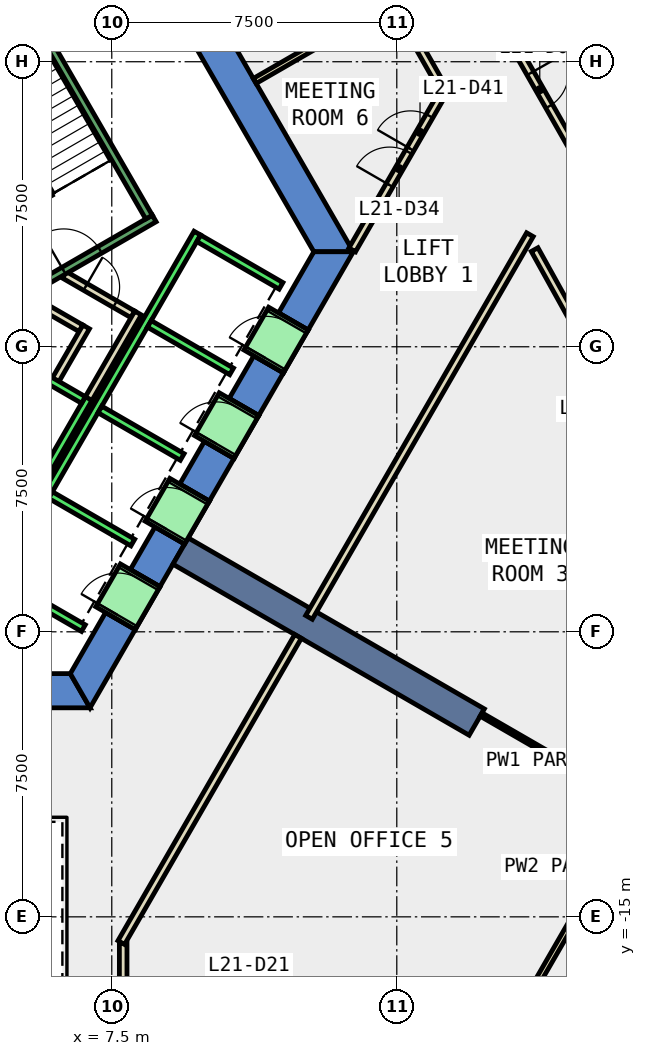
"""IFC4 building model, lengths in metres.
Left out: names, types, materials, properties, quantities, classifications, styles, units other than length and angle.
Written with IfcOpenShell. Run it as: python <this file> out.ifc"""

import sys

from ifc_helpers import new_model, si_unit, direction, frame, frame_2d, origin, place, context, subcontext, project, spatial, polyline, rectangle, outline, extrude, element, fill, save


model = new_model("IFC4")
c1 = context("Model", 3, precision=1e-05, world=origin(), true_north=direction((0.0, 1.0)))
c2 = subcontext(c1, "Body", "Model", "MODEL_VIEW")
j1 = project(units=[si_unit("LENGTHUNIT", "METRE"), si_unit("PLANEANGLEUNIT", "RADIAN")], contexts=[c1])
p1 = place(None, origin())
s1 = spatial("IfcSite", under=j1, at=p1, CompositionType="ELEMENT")
p2 = place(p1, origin())
s2 = spatial("IfcBuilding", under=s1, at=p2, CompositionType="ELEMENT")
p3 = place(p2, frame((0.0, 0.0, 99.2)))
s3 = spatial("IfcBuildingStorey", under=s2, at=p3, CompositionType="ELEMENT", Elevation=99.2)
p4 = place(p3, frame((0.0, 0.0, -0.4)))
e1 = element("IfcWall", 1, at=p4, inside=s3, PredefinedType="SHEAR", context=c2, shape_type="SweptSolid", body=[
    extrude(outline(polyline([(8.517, 11.748), (7.738, 11.298), (12.817, 2.5), (13.856, 2.5), (8.517, 11.748)])), origin(), (0.0, 0.0, 1.0), 4.2),
])
p5 = place(p3, frame((0.0, 0.0, -0.4)))
e2 = element("IfcWall", 2, at=p5, inside=s3, PredefinedType="SHEAR", context=c2, shape_type="SweptSolid", body=[
    extrude(outline(polyline([(5.75, -8.6), (5.75, -9.5), (6.928, -9.5), (6.409, -8.6), (5.75, -8.6)])), origin(), (0.0, 0.0, 1.0), 4.2),
])
p6 = place(p3, frame((0.0, 0.0, -0.4)))
e3 = element("IfcWall", 3, at=p6, inside=s3, PredefinedType="SHEAR", context=c2, shape_type="SweptSolid", body=[
    extrude(outline(polyline([(8.117, -7.44), (7.338, -6.99), (6.409, -8.6), (6.928, -9.5), (8.117, -7.44)])), origin(), (0.0, 0.0, 1.0), 4.2),
])
p7 = place(p3, frame((0.0, 0.0, -0.4)))
e4 = element("IfcWall", 4, at=p7, inside=s3, PredefinedType="SHEAR", context=c2, shape_type="SweptSolid", body=[
    extrude(outline(polyline([(9.417, -5.189), (8.638, -4.739), (7.988, -5.864), (8.767, -6.314), (9.417, -5.189)])), origin(), (0.0, 0.0, 1.0), 4.2),
])
p8 = place(p3, frame((0.0, 0.0, -0.4)))
e5 = element("IfcWall", 5, at=p8, inside=s3, PredefinedType="SHEAR", context=c2, shape_type="SweptSolid", body=[
    extrude(outline(polyline([(10.717, -2.937), (9.938, -2.487), (9.288, -3.613), (10.067, -4.063), (10.717, -2.937)])), origin(), (0.0, 0.0, 1.0), 4.2),
])
p9 = place(p3, frame((0.0, 0.0, -0.4)))
e6 = element("IfcWall", 6, at=p9, inside=s3, PredefinedType="SHEAR", context=c2, shape_type="SweptSolid", body=[
    extrude(outline(polyline([(12.017, -0.686), (11.238, -0.236), (10.588, -1.361), (11.367, -1.811), (12.017, -0.686)])), origin(), (0.0, 0.0, 1.0), 4.2),
])
p10 = place(p3, frame((0.0, 0.0, -0.4)))
e7 = element("IfcWall", 7, at=p10, inside=s3, PredefinedType="SHEAR", context=c2, shape_type="SweptSolid", body=[
    extrude(outline(polyline([(11.888, 0.89), (12.667, 0.44), (13.856, 2.5), (12.817, 2.5), (11.888, 0.89)])), origin(), (0.0, 0.0, 1.0), 4.2),
])
p11 = place(p3, frame((0.0, 0.0, 3.6)))
e8 = element("IfcWall", 8, at=p11, inside=s3, PredefinedType="SHEAR", context=c2, shape_type="SweptSolid", body=[
    extrude(outline(polyline([(8.767, -6.314), (7.988, -5.864), (7.338, -6.99), (8.117, -7.44), (8.767, -6.314)])), origin(), (0.0, 0.0, 1.0), 0.2),
])
p12 = place(p3, frame((0.0, 0.0, 3.6)))
e9 = element("IfcWall", 9, at=p12, inside=s3, PredefinedType="SHEAR", context=c2, shape_type="SweptSolid", body=[
    extrude(outline(polyline([(10.067, -4.063), (9.288, -3.613), (8.638, -4.739), (9.417, -5.189), (10.067, -4.063)])), origin(), (0.0, 0.0, 1.0), 0.2),
])
p13 = place(p3, frame((0.0, 0.0, 3.6)))
e10 = element("IfcWall", 10, at=p13, inside=s3, PredefinedType="SHEAR", context=c2, shape_type="SweptSolid", body=[
    extrude(outline(polyline([(11.367, -1.811), (10.588, -1.361), (9.938, -2.487), (10.717, -2.937), (11.367, -1.811)])), origin(), (0.0, 0.0, 1.0), 0.2),
])
p14 = place(p3, frame((0.0, 0.0, 3.6)))
e11 = element("IfcWall", 11, at=p14, inside=s3, PredefinedType="SHEAR", context=c2, shape_type="SweptSolid", body=[
    extrude(outline(polyline([(12.667, 0.44), (11.888, 0.89), (11.238, -0.236), (12.017, -0.686), (12.667, 0.44)])), origin(), (0.0, 0.0, 1.0), 0.2),
])
p15 = place(p3, frame((9.31, -5.375, -0.4), z_axis=(0.0, 0.0, 1.0), x_axis=(0.866017533419, -0.500013631625, 0.0)))
e12 = element("IfcWall", 12, at=p15, inside=s3, PredefinedType="SHEAR", context=c2, shape_type="SweptSolid", body=[
    extrude(rectangle(XDim=9.0, YDim=0.8, at=frame_2d((4.5, 0.0))), origin(), (0.0, 0.0, 1.0), 4.2),
])
p16 = place(p3, frame((16.195, 6.824, 0.0), z_axis=(0.0, 0.0, 1.0), x_axis=(-0.494984897559, 0.868901577388, 0.0)))
e13 = element("IfcWall", 13, at=p16, inside=s3, PredefinedType="PARTITIONING", context=c2, shape_type="SweptSolid", body=[
    extrude(rectangle(XDim=2.188, YDim=0.2, at=frame_2d((1.094, 0.0))), origin(), (0.0, 0.0, 1.0), 3.8),
])
p17 = place(p3, frame((22.071, -3.65, 0.0), z_axis=(0.0, 0.0, 1.0), x_axis=(-0.485198988697, 0.874403763354, 0.0)))
e14 = element("IfcWall", 14, at=p17, inside=s3, PredefinedType="PARTITIONING", context=c2, shape_type="SweptSolid", body=[
    extrude(rectangle(XDim=7.098, YDim=0.2, at=frame_2d((3.549, 0.0))), origin(), (0.0, 0.0, 1.0), 3.8),
])
p18 = place(p17, frame((3.049, 0.0, 0.0)))
e15 = element("IfcOpeningElement", 15, at=p18, cuts=e14, PredefinedType="OPENING", context=c2, shape_type="SweptSolid", body=[
    extrude(rectangle(XDim=1.0, YDim=2.1, at=frame_2d((0.5, 1.05))), frame((0.0, 0.11, 0.0), z_axis=(0.0, -1.0, 0.0), x_axis=(1.0, 0.0, 0.0)), (0.0, 0.0, 1.0), 0.22),
])
p19 = place(p3, frame((16.98, 9.89, 0.0), z_axis=(0.0, 0.0, 1.0), x_axis=(0.495123170501, -0.868822793228, 0.0)))
e16 = element("IfcWall", 16, at=p19, inside=s3, PredefinedType="PARTITIONING", context=c2, shape_type="SweptSolid", body=[
    extrude(rectangle(XDim=7.198, YDim=0.2, at=frame_2d((3.599, 0.0))), origin(), (0.0, 0.0, 1.0), 3.8),
])
p20 = place(p19, frame((3.099, 0.0, 0.0)))
e17 = element("IfcOpeningElement", 17, at=p20, cuts=e16, PredefinedType="OPENING", context=c2, shape_type="SweptSolid", body=[
    extrude(rectangle(XDim=1.0, YDim=2.1, at=frame_2d((0.5, 1.05))), frame((0.0, 0.11, 0.0), z_axis=(0.0, -1.0, 0.0), x_axis=(1.0, 0.0, 0.0)), (0.0, 0.0, 1.0), 0.22),
])
p21 = place(p3, frame((5.499, 1.172, 0.0), z_axis=(0.0, 0.0, 1.0), x_axis=(0.866333505267, -0.499465972466, 0.0)))
e18 = element("IfcWall", 18, at=p21, inside=s3, PredefinedType="PARTITIONING", context=c2, shape_type="SweptSolid", body=[
    extrude(rectangle(XDim=1.374, YDim=0.2, at=frame_2d((0.687, 0.0))), origin(), (0.0, 0.0, 1.0), 3.8),
])
p22 = place(p3, frame((6.826, 0.522, 0.0), z_axis=(0.0, 0.0, 1.0), x_axis=(-0.500016722714, -0.866015748706, 0.0)))
e19 = element("IfcWall", 19, at=p22, inside=s3, PredefinedType="PARTITIONING", context=c2, shape_type="SweptSolid", body=[
    extrude(rectangle(XDim=1.7, YDim=0.2, at=frame_2d((0.85, 0.0))), origin(), (0.0, 0.0, 1.0), 3.8),
])
p23 = place(p3, frame((6.25, 1.894, 0.0), z_axis=(0.0, 0.0, 1.0), x_axis=(0.866043184279, -0.499969202016, 0.0)))
e20 = element("IfcWall", 20, at=p23, inside=s3, PredefinedType="PARTITIONING", context=c2, shape_type="SweptSolid", body=[
    extrude(rectangle(XDim=2.084, YDim=0.2, at=frame_2d((1.042, 0.0))), origin(), (0.0, 0.0, 1.0), 3.8),
])
p24 = place(p23, frame((0.642, 0.0, 0.0)))
e21 = element("IfcOpeningElement", 21, at=p24, cuts=e20, PredefinedType="OPENING", context=c2, shape_type="SweptSolid", body=[
    extrude(rectangle(XDim=0.9, YDim=2.1, at=frame_2d((0.45, 1.05))), frame((0.0, 0.11, 0.0), z_axis=(0.0, -1.0, 0.0), x_axis=(1.0, 0.0, 0.0)), (0.0, 0.0, 1.0), 0.22),
])
p25 = place(p3, frame((8.192, 0.888, 0.0), z_axis=(0.0, 0.0, 1.0), x_axis=(-0.499940625693, -0.866059680843, 0.0)))
e22 = element("IfcWall", 22, at=p25, inside=s3, PredefinedType="PARTITIONING", context=c2, shape_type="SweptSolid", body=[
    extrude(rectangle(XDim=2.68, YDim=0.2, at=frame_2d((1.34, 0.0))), origin(), (0.0, 0.0, 1.0), 3.8),
])
p26 = place(p3, frame((11.261, 6.994, 0.0), z_axis=(0.0, 0.0, 1.0), x_axis=(0.866037428454, 0.499979172084, 0.0)))
e23 = element("IfcWall", 23, at=p26, inside=s3, PredefinedType="PARTITIONING", context=c2, shape_type="SweptSolid", body=[
    extrude(rectangle(XDim=4.198, YDim=0.15, at=frame_2d((2.099, 0.0))), origin(), (0.0, 0.0, 1.0), 3.8),
])
p27 = place(p3, frame((13.827, 2.55, 0.0), z_axis=(0.0, 0.0, 1.0), x_axis=(0.500070719615, 0.865984569946, 0.0)))
e24 = element("IfcWall", 24, at=p27, inside=s3, PredefinedType="PARTITIONING", context=c2, shape_type="SweptSolid", body=[
    extrude(rectangle(XDim=4.935, YDim=0.2, at=frame_2d((2.468, 0.0))), origin(), (0.0, 0.0, 1.0), 3.8),
])
p28 = place(p27, frame((1.968, 0.0, 0.0)))
e25 = element("IfcOpeningElement", 25, at=p28, cuts=e24, PredefinedType="OPENING", context=c2, shape_type="SweptSolid", body=[
    extrude(rectangle(XDim=1.0, YDim=2.1, at=frame_2d((0.5, 1.05))), frame((0.0, 0.11, 0.0), z_axis=(0.0, -1.0, 0.0), x_axis=(1.0, 0.0, 0.0)), (0.0, 0.0, 1.0), 0.22),
])
p29 = place(p27, frame((3.068, 0.0, 0.0)))
e26 = element("IfcOpeningElement", 26, at=p29, cuts=e24, PredefinedType="OPENING", context=c2, shape_type="SweptSolid", body=[
    extrude(rectangle(XDim=1.0, YDim=2.1, at=frame_2d((0.5, 1.05))), frame((0.0, 0.11, 0.0), z_axis=(0.0, -1.0, 0.0), x_axis=(1.0, 0.0, 0.0)), (0.0, 0.0, 1.0), 0.22),
])
p30 = place(p3, frame((7.8, -15.69, 0.0), z_axis=(0.0, 0.0, 1.0), x_axis=(0.0, -1.0, 0.0)))
e27 = element("IfcWall", 27, at=p30, inside=s3, PredefinedType="PARTITIONING", context=c2, shape_type="SweptSolid", body=[
    extrude(rectangle(XDim=1.7, YDim=0.2, at=frame_2d((0.85, 0.0))), origin(), (0.0, 0.0, 1.0), 3.8),
])
p31 = place(p3, frame((12.401, -7.621, 0.0), z_axis=(0.0, 0.0, 1.0), x_axis=(-0.499983724212, -0.866034800411, 0.0)))
e28 = element("IfcWall", 28, at=p31, inside=s3, PredefinedType="PARTITIONING", context=c2, shape_type="SweptSolid", body=[
    extrude(rectangle(XDim=9.302, YDim=0.2, at=frame_2d((4.651, 0.0))), origin(), (0.0, 0.0, 1.0), 3.8),
])
p32 = place(p3, frame((18.503, 2.949, 0.0), z_axis=(0.0, 0.0, 1.0), x_axis=(-0.49997390151, -0.86604047123, 0.0)))
e29 = element("IfcWall", 29, at=p32, inside=s3, PredefinedType="PARTITIONING", context=c2, shape_type="SweptSolid", body=[
    extrude(rectangle(XDim=11.626, YDim=0.2, at=frame_2d((5.813, 0.0))), origin(), (0.0, 0.0, 1.0), 3.8),
])
p33 = place(p3, frame((17.219, -9.676, 0.0), z_axis=(0.0, 0.0, 1.0), x_axis=(0.86598459596, -0.500070674565, 0.0)))
e30 = element("IfcWall", 30, at=p33, inside=s3, PredefinedType="PARTITIONING", context=c2, shape_type="SweptSolid", body=[
    extrude(rectangle(XDim=4.875, YDim=0.1, at=frame_2d((2.438, 0.0))), origin(), (0.0, 0.0, 1.0), 3.8),
])
p34 = place(p3, frame((21.236, -12.319, 0.0), z_axis=(0.0, 0.0, 1.0), x_axis=(-0.500016488359, -0.866015884017, 0.0)))
e31 = element("IfcWall", 31, at=p34, inside=s3, PredefinedType="PARTITIONING", context=c2, shape_type="SweptSolid", body=[
    extrude(rectangle(XDim=5.702, YDim=0.15, at=frame_2d((2.851, 0.0))), origin(), (0.0, 0.0, 1.0), 3.8),
])
p35 = place(p3, frame((5.492, -3.788, 0.0), z_axis=(0.0, 0.0, 1.0), x_axis=(0.500011755427, 0.866018616679, 0.0)))
e32 = element("IfcWall", 32, at=p35, inside=s3, PredefinedType="STANDARD", context=c2, shape_type="SweptSolid", body=[
    extrude(rectangle(XDim=2.8, YDim=0.2, at=frame_2d((1.4, 0.0))), origin(), (0.0, 0.0, 1.0), 3.8),
])
p36 = place(p3, frame((4.677, -0.2, 0.0), z_axis=(0.0, 0.0, 1.0), x_axis=(0.865973769406, -0.500089422704, 0.0)))
e33 = element("IfcWall", 33, at=p36, inside=s3, PredefinedType="STANDARD", context=c2, shape_type="SweptSolid", body=[
    extrude(rectangle(XDim=2.399, YDim=0.2, at=frame_2d((1.2, 0.0))), origin(), (0.0, 0.0, 1.0), 3.8),
])
p37 = place(p3, frame((4.451, -6.19, 0.0), z_axis=(0.0, 0.0, 1.0), x_axis=(0.50000090737, 0.866024879913, 0.0)))
e34 = element("IfcWall", 34, at=p37, inside=s3, PredefinedType="STANDARD", context=c2, shape_type="SweptSolid", body=[
    extrude(rectangle(XDim=10.6, YDim=0.2, at=frame_2d((5.3, 0.0))), origin(), (0.0, 0.0, 1.0), 3.8),
])
for number, where, z_axis, x_axis in (
    (35, (4.588, -6.153, 0.0), (0.0, 0.0, 1.0), (0.866, -0.5, 0.0)),
    (36, (5.888, -3.902, 0.0), (0.0, 0.0, 1.0), (0.866, -0.5, 0.0)),
    (37, (7.188, -1.65, 0.0), (0.0, 0.0, 1.0), (0.866, -0.5, 0.0)),
    (38, (8.488, 0.602, 0.0), (0.0, 0.0, 1.0), (0.866, -0.5, 0.0)),
):
    element("IfcWall", number, at=place(p3, frame(where, z_axis=z_axis, x_axis=x_axis)), inside=s3, PredefinedType="STANDARD", context=c2, shape_type="SweptSolid", body=[
        extrude(rectangle(XDim=2.5, YDim=0.2, at=frame_2d((1.25, 0.0))), origin(), (0.0, 0.0, 1.0), 3.8),
    ])
p38 = place(p3, frame((9.788, 2.853, 0.0), z_axis=(0.0, 0.0, 1.0), x_axis=(0.865998541277, -0.500046524342, 0.0)))
e39 = element("IfcWall", 39, at=p38, inside=s3, PredefinedType="STANDARD", context=c2, shape_type="SweptSolid", body=[
    extrude(rectangle(XDim=2.5, YDim=0.2, at=frame_2d((1.25, 0.0))), origin(), (0.0, 0.0, 1.0), 3.8),
])
p39 = place(p3, frame((7.598, -7.14, 0.0), z_axis=(0.0, 0.0, 1.0), x_axis=(0.500362116554, 0.865816234728, 0.0)))
e40 = element("IfcWall", 40, at=p39, inside=s3, PredefinedType="STANDARD", context=c2, shape_type="SweptSolid", body=[
    extrude(rectangle(XDim=1.299, YDim=1.2, at=frame_2d((0.65, 0.0))), origin(), (0.0, 0.0, 1.0), 2.4),
])
p40 = place(p39, frame((0.1, 0.0, 0.0)))
e41 = element("IfcOpeningElement", 41, at=p40, cuts=e40, PredefinedType="OPENING", context=c2, shape_type="SweptSolid", body=[
    extrude(rectangle(XDim=1.1, YDim=2.3, at=frame_2d((0.55, 1.15))), frame((0.0, 0.61, 0.0), z_axis=(0.0, -1.0, 0.0), x_axis=(1.0, 0.0, 0.0)), (0.0, 0.0, 1.0), 1.22),
])
p41 = place(p3, frame((8.898, -4.889, 0.0), z_axis=(0.0, 0.0, 1.0), x_axis=(0.500036693733, 0.866004217611, 0.0)))
e42 = element("IfcWall", 42, at=p41, inside=s3, PredefinedType="STANDARD", context=c2, shape_type="SweptSolid", body=[
    extrude(rectangle(XDim=1.3, YDim=1.2, at=frame_2d((0.65, 0.0))), origin(), (0.0, 0.0, 1.0), 2.4),
])
p42 = place(p41, frame((0.1, 0.0, 0.0)))
e43 = element("IfcOpeningElement", 43, at=p42, cuts=e42, PredefinedType="OPENING", context=c2, shape_type="SweptSolid", body=[
    extrude(rectangle(XDim=1.1, YDim=2.3, at=frame_2d((0.55, 1.15))), frame((0.0, 0.61, 0.0), z_axis=(0.0, -1.0, 0.0), x_axis=(1.0, 0.0, 0.0)), (0.0, 0.0, 1.0), 1.22),
])
p43 = place(p3, frame((10.198, -2.637, 0.0), z_axis=(0.0, 0.0, 1.0), x_axis=(0.49989585183, 0.866085525409, 0.0)))
e44 = element("IfcWall", 44, at=p43, inside=s3, PredefinedType="STANDARD", context=c2, shape_type="SweptSolid", body=[
    extrude(rectangle(XDim=1.3, YDim=1.2, at=frame_2d((0.65, 0.0))), origin(), (0.0, 0.0, 1.0), 2.4),
])
p44 = place(p43, frame((0.1, 0.0, 0.0)))
e45 = element("IfcOpeningElement", 45, at=p44, cuts=e44, PredefinedType="OPENING", context=c2, shape_type="SweptSolid", body=[
    extrude(rectangle(XDim=1.1, YDim=2.3, at=frame_2d((0.55, 1.15))), frame((0.0, 0.61, 0.0), z_axis=(0.0, -1.0, 0.0), x_axis=(1.0, 0.0, 0.0)), (0.0, 0.0, 1.0), 1.22),
])
p45 = place(p3, frame((11.498, -0.385, 0.0), z_axis=(0.0, 0.0, 1.0), x_axis=(0.500221244143, 0.865897630733, 0.0)))
e46 = element("IfcWall", 46, at=p45, inside=s3, PredefinedType="STANDARD", context=c2, shape_type="SweptSolid", body=[
    extrude(rectangle(XDim=1.299, YDim=1.2, at=frame_2d((0.65, 0.0))), origin(), (0.0, 0.0, 1.0), 2.4),
])
p46 = place(p45, frame((0.1, 0.0, 0.0)))
e47 = element("IfcOpeningElement", 47, at=p46, cuts=e46, PredefinedType="OPENING", context=c2, shape_type="SweptSolid", body=[
    extrude(rectangle(XDim=1.1, YDim=2.3, at=frame_2d((0.55, 1.15))), frame((0.0, 0.61, 0.0), z_axis=(0.0, -1.0, 0.0), x_axis=(1.0, 0.0, 0.0)), (0.0, 0.0, 1.0), 1.22),
])
p47 = place(p3, frame((4.806, 1.176, 0.0), z_axis=(0.0, 0.0, 1.0), x_axis=(0.866059941101, 0.499940174841, 0.0)))
e48 = element("IfcWall", 48, at=p47, inside=s3, PredefinedType="STANDARD", context=c2, shape_type="SweptSolid", body=[
    extrude(rectangle(XDim=4.4, YDim=0.2, at=frame_2d((2.2, 0.0))), origin(), (0.0, 0.0, 1.0), 3.8),
])
p48 = place(p47, frame((1.65, 0.0, 0.0)))
e49 = element("IfcOpeningElement", 49, at=p48, cuts=e48, PredefinedType="OPENING", context=c2, shape_type="SweptSolid", body=[
    extrude(rectangle(XDim=1.1, YDim=2.2, at=frame_2d((0.55, 1.1))), frame((0.0, 0.11, 0.0), z_axis=(0.0, -1.0, 0.0), x_axis=(1.0, 0.0, 0.0)), (0.0, 0.0, 1.0), 0.22),
])
p49 = place(p3, frame((8.48, 3.412, 0.0), z_axis=(0.0, 0.0, 1.0), x_axis=(-0.499978703459, 0.866037698999, 0.0)))
e50 = element("IfcWall", 50, at=p49, inside=s3, PredefinedType="STANDARD", context=c2, shape_type="SweptSolid", body=[
    extrude(rectangle(XDim=6.9, YDim=0.2, at=frame_2d((3.45, 0.0))), origin(), (0.0, 0.0, 1.0), 3.8),
])
p50 = place(p20, origin())
e51 = element("IfcDoor", 51, at=p50, inside=s3, OperationType="SINGLE_SWING_LEFT", PredefinedType="DOOR", context=c2, shape_type="SweptSolid", body=[
    extrude(rectangle(XDim=1.0, YDim=2.1, at=frame_2d((0.5, 1.05))), frame((0.0, 0.025, 0.0), z_axis=(0.0, -1.0, 0.0), x_axis=(1.0, 0.0, 0.0)), (0.0, 0.0, 1.0), 0.05),
])
fill(e17, e51)
p51 = place(p28, origin())
e52 = element("IfcDoor", 52, at=p51, inside=s3, OperationType="SINGLE_SWING_LEFT", PredefinedType="DOOR", context=c2, shape_type="SweptSolid", body=[
    extrude(rectangle(XDim=1.0, YDim=2.1, at=frame_2d((0.5, 1.05))), frame((0.0, 0.025, 0.0), z_axis=(0.0, -1.0, 0.0), x_axis=(1.0, 0.0, 0.0)), (0.0, 0.0, 1.0), 0.05),
])
fill(e25, e52)
p52 = place(p24, origin())
e53 = element("IfcDoor", 53, at=p52, inside=s3, OperationType="SINGLE_SWING_LEFT", PredefinedType="DOOR", context=c2, shape_type="SweptSolid", body=[
    extrude(rectangle(XDim=0.9, YDim=2.1, at=frame_2d((0.45, 1.05))), frame((0.0, 0.025, 0.0), z_axis=(0.0, -1.0, 0.0), x_axis=(1.0, 0.0, 0.0)), (0.0, 0.0, 1.0), 0.05),
])
fill(e21, e53)
p53 = place(p29, origin())
e54 = element("IfcDoor", 54, at=p53, inside=s3, OperationType="SINGLE_SWING_RIGHT", PredefinedType="DOOR", context=c2, shape_type="SweptSolid", body=[
    extrude(rectangle(XDim=1.0, YDim=2.1, at=frame_2d((0.5, 1.05))), frame((0.0, 0.025, 0.0), z_axis=(0.0, -1.0, 0.0), x_axis=(1.0, 0.0, 0.0)), (0.0, 0.0, 1.0), 0.05),
])
fill(e26, e54)
p54 = place(p40, origin())
e55 = element("IfcDoor", 55, at=p54, inside=s3, OperationType="SLIDING_TO_LEFT", PredefinedType="DOOR", context=c2, shape_type="SweptSolid", body=[
    extrude(rectangle(XDim=1.1, YDim=2.3, at=frame_2d((0.55, 1.15))), frame((0.0, 0.025, 0.0), z_axis=(0.0, -1.0, 0.0), x_axis=(1.0, 0.0, 0.0)), (0.0, 0.0, 1.0), 0.05),
])
fill(e41, e55)
p55 = place(p42, origin())
e56 = element("IfcDoor", 56, at=p55, inside=s3, OperationType="SLIDING_TO_LEFT", PredefinedType="DOOR", context=c2, shape_type="SweptSolid", body=[
    extrude(rectangle(XDim=1.1, YDim=2.3, at=frame_2d((0.55, 1.15))), frame((0.0, 0.025, 0.0), z_axis=(0.0, -1.0, 0.0), x_axis=(1.0, 0.0, 0.0)), (0.0, 0.0, 1.0), 0.05),
])
fill(e43, e56)
p56 = place(p44, origin())
e57 = element("IfcDoor", 57, at=p56, inside=s3, OperationType="SLIDING_TO_LEFT", PredefinedType="DOOR", context=c2, shape_type="SweptSolid", body=[
    extrude(rectangle(XDim=1.1, YDim=2.3, at=frame_2d((0.55, 1.15))), frame((0.0, 0.025, 0.0), z_axis=(0.0, -1.0, 0.0), x_axis=(1.0, 0.0, 0.0)), (0.0, 0.0, 1.0), 0.05),
])
fill(e45, e57)
p57 = place(p46, origin())
e58 = element("IfcDoor", 58, at=p57, inside=s3, OperationType="SLIDING_TO_LEFT", PredefinedType="DOOR", context=c2, shape_type="SweptSolid", body=[
    extrude(rectangle(XDim=1.1, YDim=2.3, at=frame_2d((0.55, 1.15))), frame((0.0, 0.025, 0.0), z_axis=(0.0, -1.0, 0.0), x_axis=(1.0, 0.0, 0.0)), (0.0, 0.0, 1.0), 0.05),
])
fill(e47, e58)
p58 = place(p48, origin())
e59 = element("IfcDoor", 59, at=p58, inside=s3, OperationType="SINGLE_SWING_LEFT", PredefinedType="DOOR", context=c2, shape_type="SweptSolid", body=[
    extrude(rectangle(XDim=1.1, YDim=2.2, at=frame_2d((0.55, 1.1))), frame((0.0, 0.025, 0.0), z_axis=(0.0, -1.0, 0.0), x_axis=(1.0, 0.0, 0.0)), (0.0, 0.0, 1.0), 0.05),
])
fill(e49, e59)
save(model, sys.argv[1])
